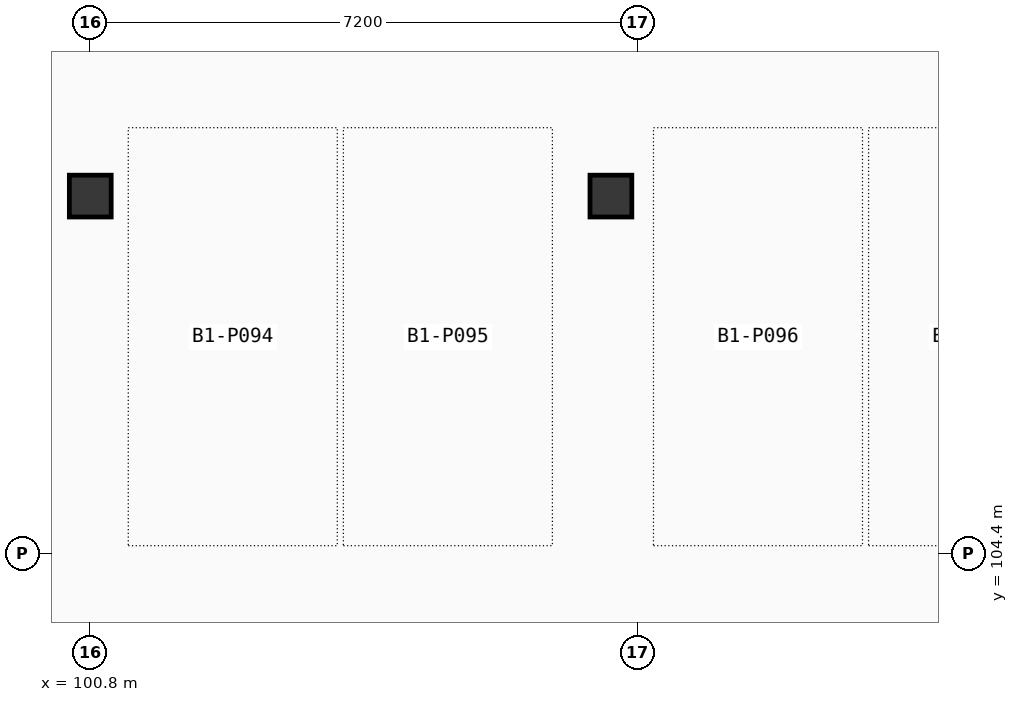
"""IFC4 building model, lengths in metres.
Left out: names, types, materials, properties, quantities, classifications, styles, units other than length and angle.
Written with IfcOpenShell. Run it as: python <this file> out.ifc"""

import sys

from ifc_helpers import new_model, si_unit, direction, frame, origin, origin_2d, place, context, subcontext, project, spatial, rectangle, extrude, element, save


model = new_model("IFC4")
c1 = context("Model", 3, precision=1e-05, world=origin(), true_north=direction((0.0, 1.0)))
c2 = subcontext(c1, "Body", "Model", "MODEL_VIEW")
j1 = project(units=[si_unit("LENGTHUNIT", "METRE"), si_unit("PLANEANGLEUNIT", "RADIAN")], contexts=[c1])
p1 = place(None, origin())
s1 = spatial("IfcSite", under=j1, at=p1, CompositionType="ELEMENT")
p2 = place(p1, origin())
s2 = spatial("IfcBuilding", under=s1, at=p2, CompositionType="ELEMENT")
p3 = place(p2, frame((0.0, 0.0, -4.2)))
s3 = spatial("IfcBuildingStorey", under=s2, at=p3, CompositionType="ELEMENT", Elevation=-4.2)
for number, where, z_axis, x_axis in (
    (1, (100.8, 109.1, 0.0), (0.0, 0.0, 1.0), (1.0, 0.0, 0.0)),
    (2, (107.65, 109.1, 0.0), (0.0, 0.0, 1.0), (1.0, 0.0, 0.0)),
):
    element("IfcColumn", number, at=place(p3, frame(where, z_axis=z_axis, x_axis=x_axis)), inside=s3, PredefinedType="COLUMN", context=c2, shape_type="SweptSolid", body=[
        extrude(rectangle(XDim=0.55, YDim=0.55, at=origin_2d()), origin(), (0.0, 0.0, 1.0), 4.2),
    ])
save(model, sys.argv[1])
